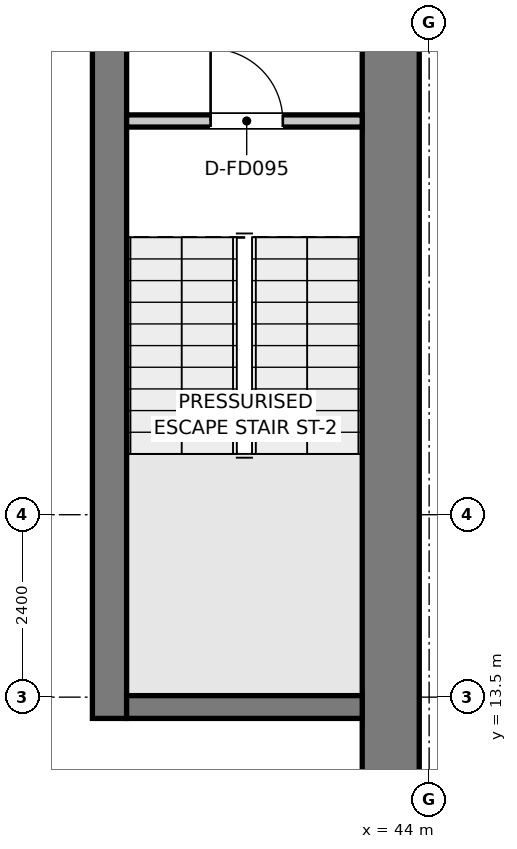
"""IFC4 building model, lengths in metres.
Left out: names, types, materials, properties, quantities, classifications, styles, units other than length and angle.
Written with IfcOpenShell. Run it as: python <this file> out.ifc"""

import sys

from ifc_helpers import new_model, si_unit, direction, frame, frame_2d, origin, place, context, subcontext, project, spatial, rectangle, extrude, element, fill, save


model = new_model("IFC4")
c1 = context("Model", 3, precision=1e-05, world=origin(), true_north=direction((0.0, 1.0)))
c2 = subcontext(c1, "Body", "Model", "MODEL_VIEW")
j1 = project(units=[si_unit("LENGTHUNIT", "METRE"), si_unit("PLANEANGLEUNIT", "RADIAN")], contexts=[c1])
p1 = place(None, origin())
s1 = spatial("IfcSite", under=j1, at=p1, CompositionType="ELEMENT")
p2 = place(p1, origin())
s2 = spatial("IfcBuilding", under=s1, at=p2, CompositionType="ELEMENT")
p3 = place(p2, frame((0.0, 0.0, 367.05)))
s3 = spatial("IfcBuildingStorey", under=s2, at=p3, CompositionType="ELEMENT", Elevation=367.05)
p4 = place(p3, frame((39.795, 13.22, 0.0), z_axis=(0.0, 0.0, 1.0), x_axis=(0.0, 1.0, 0.0)))
e1 = element("IfcWall", 1, at=p4, inside=s3, PredefinedType="SHEAR", context=c2, shape_type="SweptSolid", body=[
    extrude(rectangle(XDim=12.83, YDim=0.45, at=frame_2d((6.415, 0.0))), origin(), (0.0, 0.0, 1.0), 3.8),
])
p5 = place(p4, frame((10.58, 0.0, 0.0)))
e2 = element("IfcOpeningElement", 2, at=p5, cuts=e1, PredefinedType="OPENING", context=c2, shape_type="SweptSolid", body=[
    extrude(rectangle(XDim=1.1, YDim=2.15, at=frame_2d((0.55, 1.075))), frame((0.0, 0.235, 0.0), z_axis=(0.0, -1.0, 0.0), x_axis=(1.0, 0.0, 0.0)), (0.0, 0.0, 1.0), 0.47),
])
p6 = place(p3, frame((43.495, 11.25, 0.0), z_axis=(0.0, 0.0, 1.0), x_axis=(0.0, 1.0, 0.0)))
e3 = element("IfcWall", 3, at=p6, inside=s3, PredefinedType="SHEAR", context=c2, shape_type="SweptSolid", body=[
    extrude(rectangle(XDim=14.8, YDim=0.75, at=frame_2d((7.4, 0.0))), origin(), (0.0, 0.0, 1.0), 3.8),
])
p7 = place(p3, frame((40.02, 13.37, 0.0), z_axis=(0.0, 0.0, 1.0), x_axis=(1.0, 0.0, 0.0)))
e4 = element("IfcWall", 4, at=p7, inside=s3, PredefinedType="SHEAR", context=c2, shape_type="SweptSolid", body=[
    extrude(rectangle(XDim=3.1, YDim=0.3, at=frame_2d((1.55, 0.0))), origin(), (0.0, 0.0, 1.0), 3.8),
])
p8 = place(p3, frame((40.02, 21.08, 0.0), z_axis=(0.0, 0.0, 1.0), x_axis=(1.0, 0.0, 0.0)))
e5 = element("IfcWall", 5, at=p8, inside=s3, PredefinedType="PARTITIONING", context=c2, shape_type="SweptSolid", body=[
    extrude(rectangle(XDim=3.1, YDim=0.16, at=frame_2d((1.55, 0.0))), origin(), (0.0, 0.0, 1.0), 3.5),
])
p9 = place(p8, frame((1.105, 0.0, 0.0)))
e6 = element("IfcOpeningElement", 6, at=p9, cuts=e5, PredefinedType="OPENING", context=c2, shape_type="SweptSolid", body=[
    extrude(rectangle(XDim=0.95, YDim=2.1, at=frame_2d((0.475, 1.05))), frame((0.0, 0.09, 0.0), z_axis=(0.0, -1.0, 0.0), x_axis=(1.0, 0.0, 0.0)), (0.0, 0.0, 1.0), 0.18),
])
p10 = place(p9, origin())
e7 = element("IfcDoor", 7, at=p10, inside=s3, OperationType="SINGLE_SWING_LEFT", PredefinedType="DOOR", context=c2, shape_type="SweptSolid", body=[
    extrude(rectangle(XDim=0.95, YDim=2.1, at=frame_2d((0.475, 1.05))), frame((0.0, 0.025, 0.0), z_axis=(0.0, -1.0, 0.0), x_axis=(1.0, 0.0, 0.0)), (0.0, 0.0, 1.0), 0.05),
])
fill(e6, e7)
save(model, sys.argv[1])
